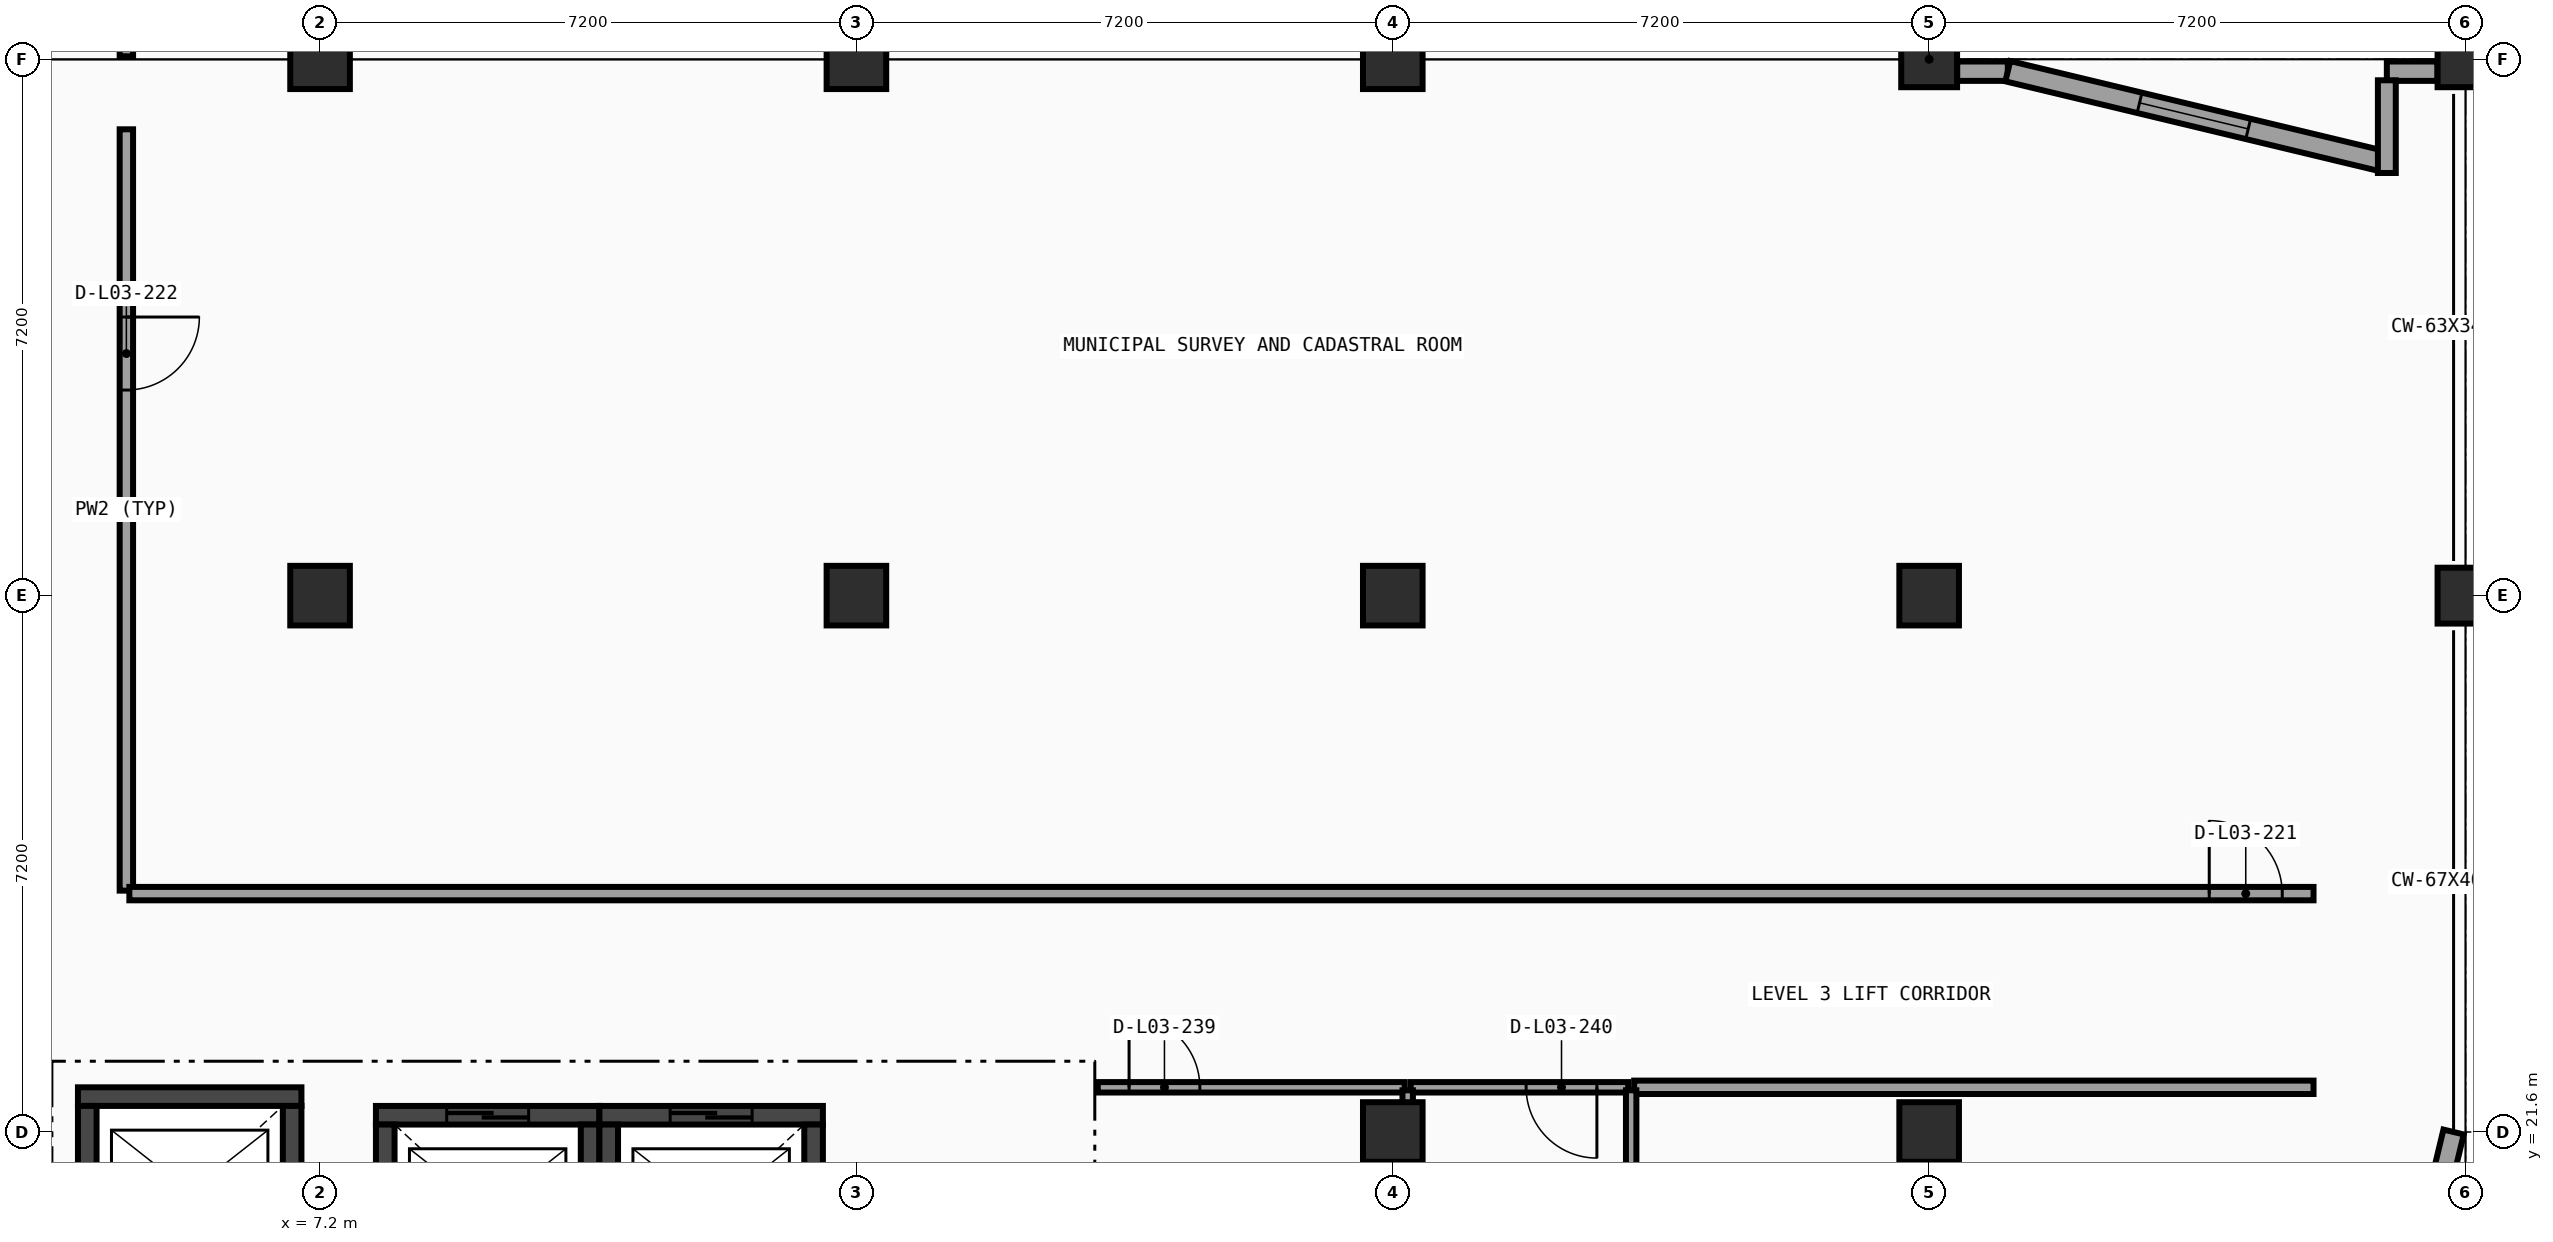
"""IFC4 building model, lengths in metres.
Left out: names, types, materials, properties, quantities, classifications, styles, units other than length and angle.
Written with IfcOpenShell. Run it as: python <this file> out.ifc"""

import sys

from ifc_helpers import new_model, si_unit, direction, frame, frame_2d, origin, origin_2d, place, context, subcontext, project, spatial, rectangle, extrude, element, fill, save


model = new_model("IFC4")
c1 = context("Model", 3, precision=1e-05, world=origin(), true_north=direction((0.0, 1.0)))
c2 = subcontext(c1, "Body", "Model", "MODEL_VIEW")
j1 = project(units=[si_unit("LENGTHUNIT", "METRE"), si_unit("PLANEANGLEUNIT", "RADIAN")], contexts=[c1])
p1 = place(None, origin())
s1 = spatial("IfcSite", under=j1, at=p1, CompositionType="ELEMENT")
p2 = place(p1, origin())
s2 = spatial("IfcBuilding", under=s1, at=p2, CompositionType="ELEMENT")
p3 = place(p2, frame((0.0, 0.0, 14.7)))
s3 = spatial("IfcBuildingStorey", under=s2, at=p3, CompositionType="ELEMENT", Elevation=14.7)
for number, where, z_axis, x_axis in (
    (1, (7.2, 28.8, 0.0), (0.0, 0.0, 1.0), (1.0, 0.0, 0.0)),
    (2, (7.2, 36.0, 0.0), (0.0, 0.0, 1.0), (1.0, 0.0, 0.0)),
    (3, (14.4, 28.8, 0.0), (0.0, 0.0, 1.0), (1.0, 0.0, 0.0)),
    (4, (14.4, 36.0, 0.0), (0.0, 0.0, 1.0), (1.0, 0.0, 0.0)),
    (5, (21.6, 21.6, 0.0), (0.0, 0.0, 1.0), (1.0, 0.0, 0.0)),
    (6, (21.6, 28.8, 0.0), (0.0, 0.0, 1.0), (1.0, 0.0, 0.0)),
    (7, (21.6, 36.0, 0.0), (0.0, 0.0, 1.0), (1.0, 0.0, 0.0)),
    (8, (28.8, 21.6, 0.0), (0.0, 0.0, 1.0), (1.0, 0.0, 0.0)),
    (9, (28.8, 28.8, 0.0), (0.0, 0.0, 1.0), (1.0, 0.0, 0.0)),
):
    element("IfcColumn", number, at=place(p3, frame(where, z_axis=z_axis, x_axis=x_axis)), inside=s3, PredefinedType="COLUMN", context=c2, shape_type="SweptSolid", body=[
        extrude(rectangle(XDim=0.8, YDim=0.8, at=origin_2d()), origin(), (0.0, 0.0, 1.0), 4.2),
    ])
for number, where, z_axis, x_axis in (
    (10, (28.8, 36.0, 0.0), (0.0, 0.0, 1.0), (1.0, 0.0, 0.0)),
    (11, (36.0, 28.8, 0.0), (0.0, 0.0, 1.0), (1.0, 0.0, 0.0)),
    (12, (36.0, 36.0, 0.0), (0.0, 0.0, 1.0), (1.0, 0.0, 0.0)),
):
    element("IfcColumn", number, at=place(p3, frame(where, z_axis=z_axis, x_axis=x_axis)), inside=s3, PredefinedType="COLUMN", context=c2, shape_type="SweptSolid", body=[
        extrude(rectangle(XDim=0.75, YDim=0.75, at=origin_2d()), origin(), (0.0, 0.0, 1.0), 4.2),
    ])
for number, where, z_axis, x_axis in (
    (13, (29.176, 35.84, 0.0), (0.0, 0.0, 1.0), (1.0, 0.0, 0.0)),
    (14, (34.944, 35.84, 0.0), (0.0, 0.0, 1.0), (1.0, 0.0, 0.0)),
):
    element("IfcWall", number, at=place(p3, frame(where, z_axis=z_axis, x_axis=x_axis)), inside=s3, PredefinedType="SOLIDWALL", context=c2, shape_type="SweptSolid", body=[
        extrude(rectangle(XDim=0.68, YDim=0.26, at=frame_2d((0.34, 0.0))), origin(), (0.0, 0.0, 1.0), 3.366),
    ])
p4 = place(p3, frame((29.856, 35.84, 0.0), z_axis=(0.0, 0.0, 1.0), x_axis=(0.972364435713, -0.233468208028, 0.0)))
e15 = element("IfcWall", 15, at=p4, inside=s3, PredefinedType="SOLIDWALL", context=c2, shape_type="SweptSolid", body=[
    extrude(rectangle(XDim=5.138, YDim=0.28, at=frame_2d((2.569, 0.0))), origin(), (0.0, 0.0, 1.0), 3.366),
])
p5 = place(p4, frame((1.819, 0.0, 0.8)))
e16 = element("IfcOpeningElement", 16, at=p5, cuts=e15, PredefinedType="OPENING", context=c2, shape_type="SweptSolid", body=[
    extrude(rectangle(XDim=1.5, YDim=1.7, at=frame_2d((0.75, 0.85))), frame((0.0, 0.15, 0.0), z_axis=(0.0, -1.0, 0.0), x_axis=(1.0, 0.0, 0.0)), (0.0, 0.0, 1.0), 0.3),
])
p6 = place(p3, frame((34.944, 34.473, 0.0), z_axis=(0.0, 0.0, 1.0), x_axis=(0.0, 1.0, 0.0)))
e17 = element("IfcWall", 17, at=p6, inside=s3, PredefinedType="SOLIDWALL", context=c2, shape_type="SweptSolid", body=[
    extrude(rectangle(XDim=1.245, YDim=0.24, at=frame_2d((0.622, 0.0))), origin(), (0.0, 0.0, 1.0), 3.95),
])
p7 = place(p3, frame((35.84, 21.6, 0.0), z_axis=(0.0, 0.0, 1.0), x_axis=(-0.233480453725, -0.972361495396, 0.0)))
e18 = element("IfcWall", 18, at=p7, inside=s3, PredefinedType="SOLIDWALL", context=c2, shape_type="SweptSolid", body=[
    extrude(rectangle(XDim=3.607, YDim=0.28, at=frame_2d((1.804, 0.0))), origin(), (0.0, 0.0, 1.0), 3.95),
])
p8 = place(p7, frame((1.054, 0.0, 0.8)))
e19 = element("IfcOpeningElement", 19, at=p8, cuts=e18, PredefinedType="OPENING", context=c2, shape_type="SweptSolid", body=[
    extrude(rectangle(XDim=1.5, YDim=1.7, at=frame_2d((0.75, 0.85))), frame((0.0, 0.15, 0.0), z_axis=(0.0, -1.0, 0.0), x_axis=(1.0, 0.0, 0.0)), (0.0, 0.0, 1.0), 0.3),
])
p9 = place(p3, frame((6.95, 22.075, 0.0), z_axis=(0.0, 0.0, 1.0), x_axis=(-1.0, 0.0, 0.0)))
e20 = element("IfcWall", 20, at=p9, inside=s3, PredefinedType="SHEAR", context=c2, shape_type="SweptSolid", body=[
    extrude(rectangle(XDim=3.0, YDim=0.25, at=frame_2d((1.5, 0.0))), origin(), (0.0, 0.0, 1.0), 3.95),
])
for number, where, z_axis, x_axis in (
    (21, (4.075, 21.95, 0.0), (0.0, 0.0, 1.0), (0.0, -1.0, 0.0)),
    (22, (6.825, 19.65, 0.0), (0.0, 0.0, 1.0), (0.0, 1.0, 0.0)),
):
    element("IfcWall", number, at=place(p3, frame(where, z_axis=z_axis, x_axis=x_axis)), inside=s3, PredefinedType="SHEAR", context=c2, shape_type="SweptSolid", body=[
        extrude(rectangle(XDim=2.3, YDim=0.25, at=frame_2d((1.15, 0.0))), origin(), (0.0, 0.0, 1.0), 3.95),
    ])
p10 = place(p3, frame((10.95, 21.825, 0.0), z_axis=(0.0, 0.0, 1.0), x_axis=(-1.0, 0.0, 0.0)))
e23 = element("IfcWall", 23, at=p10, inside=s3, PredefinedType="SHEAR", context=c2, shape_type="SweptSolid", body=[
    extrude(rectangle(XDim=3.0, YDim=0.25, at=frame_2d((1.5, 0.0))), origin(), (0.0, 0.0, 1.0), 3.95),
])
p11 = place(p10, frame((0.95, 0.0, 0.0)))
e24 = element("IfcOpeningElement", 24, at=p11, cuts=e23, PredefinedType="OPENING", context=c2, shape_type="SweptSolid", body=[
    extrude(rectangle(XDim=1.1, YDim=2.1, at=frame_2d((0.55, 1.05))), frame((0.0, 0.135, 0.0), z_axis=(0.0, -1.0, 0.0), x_axis=(1.0, 0.0, 0.0)), (0.0, 0.0, 1.0), 0.27),
])
for number, where, z_axis, x_axis in (
    (25, (8.075, 21.7, 0.0), (0.0, 0.0, 1.0), (0.0, -1.0, 0.0)),
    (26, (10.825, 19.4, 0.0), (0.0, 0.0, 1.0), (0.0, 1.0, 0.0)),
):
    element("IfcWall", number, at=place(p3, frame(where, z_axis=z_axis, x_axis=x_axis)), inside=s3, PredefinedType="SHEAR", context=c2, shape_type="SweptSolid", body=[
        extrude(rectangle(XDim=2.3, YDim=0.25, at=frame_2d((1.15, 0.0))), origin(), (0.0, 0.0, 1.0), 3.95),
    ])
p12 = place(p3, frame((13.95, 21.825, 0.0), z_axis=(0.0, 0.0, 1.0), x_axis=(-1.0, 0.0, 0.0)))
e27 = element("IfcWall", 27, at=p12, inside=s3, PredefinedType="SHEAR", context=c2, shape_type="SweptSolid", body=[
    extrude(rectangle(XDim=3.0, YDim=0.25, at=frame_2d((1.5, 0.0))), origin(), (0.0, 0.0, 1.0), 3.95),
])
p13 = place(p12, frame((0.95, 0.0, 0.0)))
e28 = element("IfcOpeningElement", 28, at=p13, cuts=e27, PredefinedType="OPENING", context=c2, shape_type="SweptSolid", body=[
    extrude(rectangle(XDim=1.1, YDim=2.1, at=frame_2d((0.55, 1.05))), frame((0.0, 0.135, 0.0), z_axis=(0.0, -1.0, 0.0), x_axis=(1.0, 0.0, 0.0)), (0.0, 0.0, 1.0), 0.27),
])
for number, where, z_axis, x_axis in (
    (29, (11.075, 21.7, 0.0), (0.0, 0.0, 1.0), (0.0, -1.0, 0.0)),
    (30, (13.825, 19.4, 0.0), (0.0, 0.0, 1.0), (0.0, 1.0, 0.0)),
):
    element("IfcWall", number, at=place(p3, frame(where, z_axis=z_axis, x_axis=x_axis)), inside=s3, PredefinedType="SHEAR", context=c2, shape_type="SweptSolid", body=[
        extrude(rectangle(XDim=2.3, YDim=0.25, at=frame_2d((1.15, 0.0))), origin(), (0.0, 0.0, 1.0), 3.95),
    ])
p14 = place(p3, frame((4.6, 24.84, 0.0), z_axis=(0.0, 0.0, 1.0), x_axis=(0.0, 1.0, 0.0)))
e31 = element("IfcWall", 31, at=p14, inside=s3, PredefinedType="PARTITIONING", context=c2, shape_type="SweptSolid", body=[
    extrude(rectangle(XDim=10.22, YDim=0.18, at=frame_2d((5.11, 0.0))), origin(), (0.0, 0.0, 1.0), 3.352),
])
p15 = place(p14, frame((6.72, 0.0, 0.0)))
e32 = element("IfcOpeningElement", 32, at=p15, cuts=e31, PredefinedType="OPENING", context=c2, shape_type="SweptSolid", body=[
    extrude(rectangle(XDim=0.98, YDim=2.1, at=frame_2d((0.49, 1.05))), frame((0.0, 0.1, 0.0), z_axis=(0.0, -1.0, 0.0), x_axis=(1.0, 0.0, 0.0)), (0.0, 0.0, 1.0), 0.2),
])
p16 = place(p3, frame((4.6, 36.04, 0.0), z_axis=(0.0, 0.0, 1.0), x_axis=(0.0, 1.0, 0.0)))
e33 = element("IfcWall", 33, at=p16, inside=s3, PredefinedType="PARTITIONING", context=c2, shape_type="SweptSolid", body=[
    extrude(rectangle(XDim=14.32, YDim=0.18, at=frame_2d((7.16, 0.0))), origin(), (0.0, 0.0, 1.0), 3.352),
])
p17 = place(p16, frame((3.545, 0.0, 0.0)))
e34 = element("IfcOpeningElement", 34, at=p17, cuts=e33, PredefinedType="OPENING", context=c2, shape_type="SweptSolid", body=[
    extrude(rectangle(XDim=0.98, YDim=2.1, at=frame_2d((0.49, 1.05))), frame((0.0, 0.1, 0.0), z_axis=(0.0, -1.0, 0.0), x_axis=(1.0, 0.0, 0.0)), (0.0, 0.0, 1.0), 0.2),
])
p18 = place(p3, frame((24.84, 22.2, 0.0), z_axis=(0.0, 0.0, 1.0), x_axis=(1.0, 0.0, 0.0)))
e35 = element("IfcWall", 35, at=p18, inside=s3, PredefinedType="PARTITIONING", context=c2, shape_type="SweptSolid", body=[
    extrude(rectangle(XDim=9.12, YDim=0.18, at=frame_2d((4.56, 0.0))), origin(), (0.0, 0.0, 1.0), 3.352),
])
p19 = place(p3, frame((4.64, 24.8, 0.0), z_axis=(0.0, 0.0, 1.0), x_axis=(1.0, 0.0, 0.0)))
e36 = element("IfcWall", 36, at=p19, inside=s3, PredefinedType="PARTITIONING", context=c2, shape_type="SweptSolid", body=[
    extrude(rectangle(XDim=29.32, YDim=0.18, at=frame_2d((14.66, 0.0))), origin(), (0.0, 0.0, 1.0), 3.352),
])
p20 = place(p19, frame((27.92, 0.0, 0.0)))
e37 = element("IfcOpeningElement", 37, at=p20, cuts=e36, PredefinedType="OPENING", context=c2, shape_type="SweptSolid", body=[
    extrude(rectangle(XDim=0.98, YDim=2.1, at=frame_2d((0.49, 1.05))), frame((0.0, 0.1, 0.0), z_axis=(0.0, -1.0, 0.0), x_axis=(1.0, 0.0, 0.0)), (0.0, 0.0, 1.0), 0.2),
])
p21 = place(p3, frame((17.64, 22.2, 0.0), z_axis=(0.0, 0.0, 1.0), x_axis=(1.0, 0.0, 0.0)))
e38 = element("IfcWall", 38, at=p21, inside=s3, PredefinedType="PARTITIONING", context=c2, shape_type="SweptSolid", body=[
    extrude(rectangle(XDim=4.12, YDim=0.14, at=frame_2d((2.06, 0.0))), origin(), (0.0, 0.0, 1.0), 3.352),
])
p22 = place(p21, frame((0.42, 0.0, 0.0)))
e39 = element("IfcOpeningElement", 39, at=p22, cuts=e38, PredefinedType="OPENING", context=c2, shape_type="SweptSolid", body=[
    extrude(rectangle(XDim=0.95, YDim=2.08, at=frame_2d((0.475, 1.04))), frame((0.0, 0.08, 0.0), z_axis=(0.0, -1.0, 0.0), x_axis=(1.0, 0.0, 0.0)), (0.0, 0.0, 1.0), 0.16),
])
p23 = place(p3, frame((21.84, 22.2, 0.0), z_axis=(0.0, 0.0, 1.0), x_axis=(1.0, 0.0, 0.0)))
e40 = element("IfcWall", 40, at=p23, inside=s3, PredefinedType="PARTITIONING", context=c2, shape_type="SweptSolid", body=[
    extrude(rectangle(XDim=2.92, YDim=0.14, at=frame_2d((1.46, 0.0))), origin(), (0.0, 0.0, 1.0), 3.95),
])
p24 = place(p23, frame((1.55, 0.0, 0.0)))
e41 = element("IfcOpeningElement", 41, at=p24, cuts=e40, PredefinedType="OPENING", context=c2, shape_type="SweptSolid", body=[
    extrude(rectangle(XDim=0.95, YDim=2.08, at=frame_2d((0.475, 1.04))), frame((0.0, 0.08, 0.0), z_axis=(0.0, -1.0, 0.0), x_axis=(1.0, 0.0, 0.0)), (0.0, 0.0, 1.0), 0.16),
])
p25 = place(p3, frame((24.8, 15.04, 0.0), z_axis=(0.0, 0.0, 1.0), x_axis=(0.0, 1.0, 0.0)))
e42 = element("IfcWall", 42, at=p25, inside=s3, PredefinedType="PARTITIONING", context=c2, shape_type="SweptSolid", body=[
    extrude(rectangle(XDim=7.12, YDim=0.14, at=frame_2d((3.56, 0.0))), origin(), (0.0, 0.0, 1.0), 3.352),
])
p26 = place(p3, frame((21.8, 18.44, 0.0), z_axis=(0.0, 0.0, 1.0), x_axis=(0.0, 1.0, 0.0)))
e43 = element("IfcWall", 43, at=p26, inside=s3, PredefinedType="PARTITIONING", context=c2, shape_type="SweptSolid", body=[
    extrude(rectangle(XDim=3.72, YDim=0.14, at=frame_2d((1.86, 0.0))), origin(), (0.0, 0.0, 1.0), 3.352),
])
p27 = place(p5, origin())
e44 = element("IfcWindow", 44, at=p27, inside=s3, PartitioningType="SINGLE_PANEL", PredefinedType="WINDOW", context=c2, shape_type="SweptSolid", body=[
    extrude(rectangle(XDim=1.5, YDim=1.7, at=frame_2d((0.75, 0.85))), frame((0.0, 0.03, 0.0), z_axis=(0.0, -1.0, 0.0), x_axis=(1.0, 0.0, 0.0)), (0.0, 0.0, 1.0), 0.06),
])
fill(e16, e44)
p28 = place(p11, origin())
e45 = element("IfcDoor", 45, at=p28, inside=s3, OperationType="SLIDING_TO_LEFT", PredefinedType="DOOR", context=c2, shape_type="SweptSolid", body=[
    extrude(rectangle(XDim=1.1, YDim=2.1, at=frame_2d((0.55, 1.05))), frame((0.0, 0.025, 0.0), z_axis=(0.0, -1.0, 0.0), x_axis=(1.0, 0.0, 0.0)), (0.0, 0.0, 1.0), 0.05),
])
fill(e24, e45)
p29 = place(p13, origin())
e46 = element("IfcDoor", 46, at=p29, inside=s3, OperationType="SLIDING_TO_LEFT", PredefinedType="DOOR", context=c2, shape_type="SweptSolid", body=[
    extrude(rectangle(XDim=1.1, YDim=2.1, at=frame_2d((0.55, 1.05))), frame((0.0, 0.025, 0.0), z_axis=(0.0, -1.0, 0.0), x_axis=(1.0, 0.0, 0.0)), (0.0, 0.0, 1.0), 0.05),
])
fill(e28, e46)
p30 = place(p20, origin())
e47 = element("IfcDoor", 47, at=p30, inside=s3, OperationType="SINGLE_SWING_LEFT", PredefinedType="DOOR", context=c2, shape_type="SweptSolid", body=[
    extrude(rectangle(XDim=0.98, YDim=2.1, at=frame_2d((0.49, 1.05))), frame((0.0, 0.025, 0.0), z_axis=(0.0, -1.0, 0.0), x_axis=(1.0, 0.0, 0.0)), (0.0, 0.0, 1.0), 0.05),
])
fill(e37, e47)
p31 = place(p15, origin())
e48 = element("IfcDoor", 48, at=p31, inside=s3, OperationType="SINGLE_SWING_RIGHT", PredefinedType="DOOR", context=c2, shape_type="SweptSolid", body=[
    extrude(rectangle(XDim=0.98, YDim=2.1, at=frame_2d((0.49, 1.05))), frame((0.0, 0.025, 0.0), z_axis=(0.0, -1.0, 0.0), x_axis=(1.0, 0.0, 0.0)), (0.0, 0.0, 1.0), 0.05),
])
fill(e32, e48)
p32 = place(p22, origin())
e49 = element("IfcDoor", 49, at=p32, inside=s3, OperationType="SINGLE_SWING_LEFT", PredefinedType="DOOR", context=c2, shape_type="SweptSolid", body=[
    extrude(rectangle(XDim=0.95, YDim=2.08, at=frame_2d((0.475, 1.04))), frame((0.0, 0.025, 0.0), z_axis=(0.0, -1.0, 0.0), x_axis=(1.0, 0.0, 0.0)), (0.0, 0.0, 1.0), 0.05),
])
fill(e39, e49)
p33 = place(p24, origin())
e50 = element("IfcDoor", 50, at=p33, inside=s3, OperationType="SINGLE_SWING_RIGHT", PredefinedType="DOOR", context=c2, shape_type="SweptSolid", body=[
    extrude(rectangle(XDim=0.95, YDim=2.08, at=frame_2d((0.475, 1.04))), frame((0.0, 0.025, 0.0), z_axis=(0.0, -1.0, 0.0), x_axis=(1.0, 0.0, 0.0)), (0.0, 0.0, 1.0), 0.05),
])
fill(e41, e50)
save(model, sys.argv[1])
